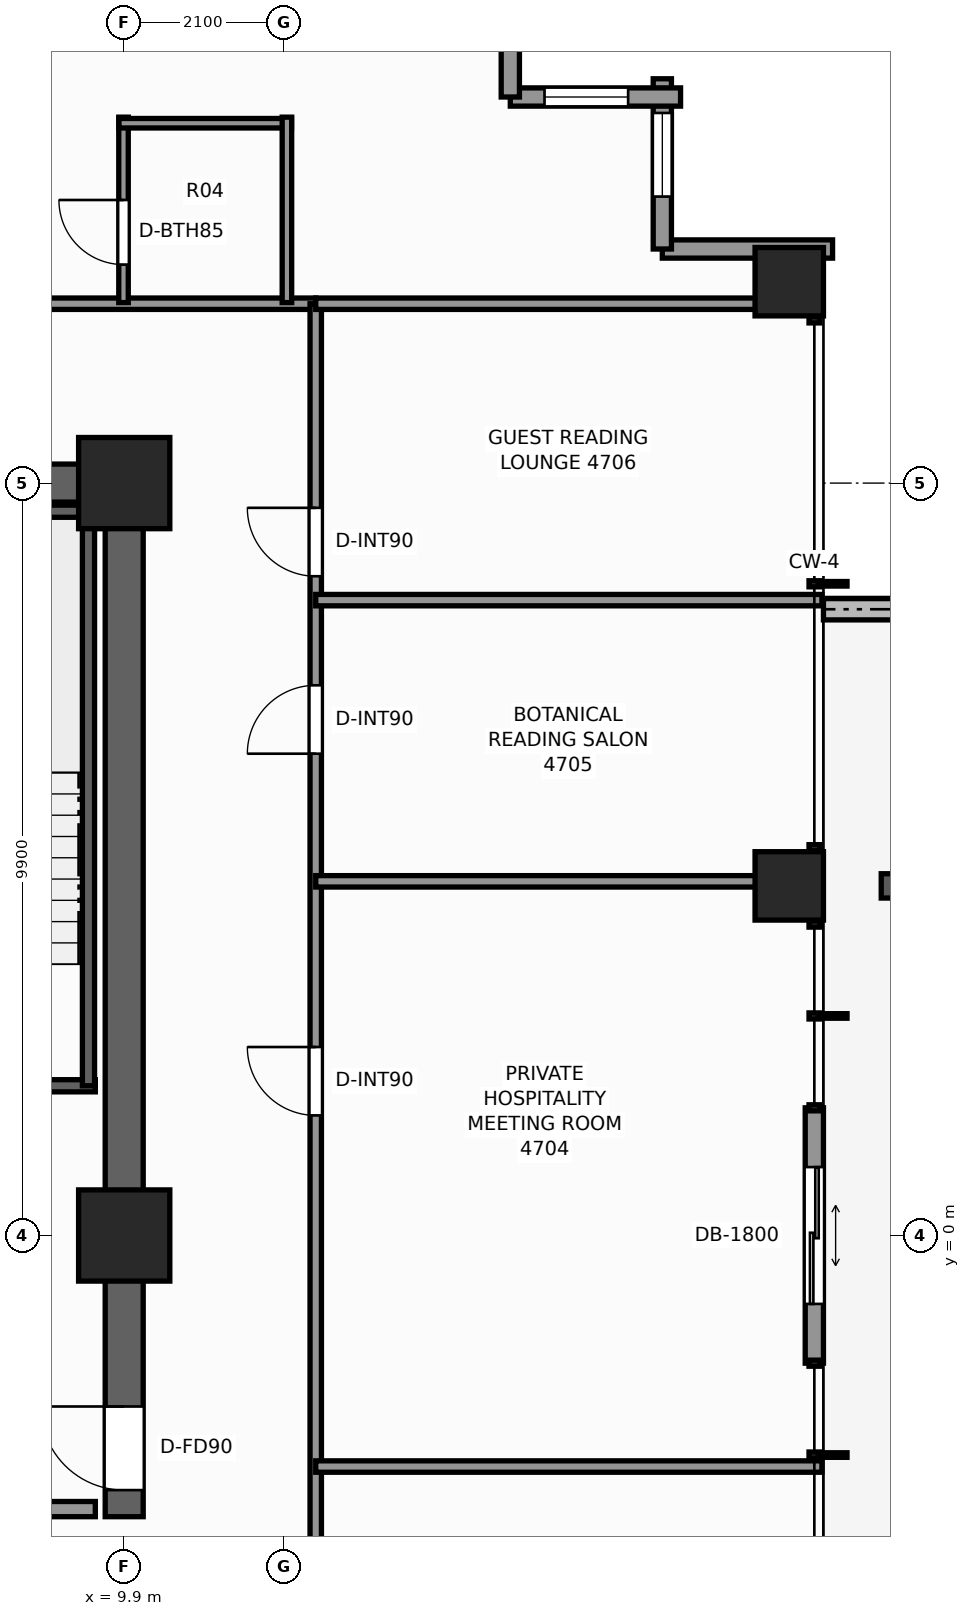
"""IFC4 building model, lengths in metres.
Left out: names, types, materials, properties, quantities, classifications, styles, units other than length and angle.
Written with IfcOpenShell. Run it as: python <this file> out.ifc"""

import sys

from ifc_helpers import new_model, si_unit, direction, frame, frame_2d, origin, origin_2d, place, context, subcontext, project, spatial, rectangle, extrude, element, fill, save


model = new_model("IFC4")
c1 = context("Model", 3, precision=1e-05, world=origin(), true_north=direction((0.0, 1.0)))
c2 = subcontext(c1, "Body", "Model", "MODEL_VIEW")
j1 = project(units=[si_unit("LENGTHUNIT", "METRE"), si_unit("PLANEANGLEUNIT", "RADIAN")], contexts=[c1])
p1 = place(None, origin())
s1 = spatial("IfcSite", under=j1, at=p1, CompositionType="ELEMENT")
p2 = place(p1, origin())
s2 = spatial("IfcBuilding", under=s1, at=p2, CompositionType="ELEMENT")
p3 = place(p2, frame((0.0, 0.0, 163.5)))
s3 = spatial("IfcBuildingStorey", under=s2, at=p3, CompositionType="ELEMENT", Elevation=163.5)
p4 = place(p3, frame((5.98, 9.9, 0.0), z_axis=(0.0, 0.0, 1.0), x_axis=(1.0, 0.0, 0.0)))
e1 = element("IfcWall", 1, at=p4, inside=s3, PredefinedType="SHEAR", context=c2, shape_type="SweptSolid", body=[
    extrude(rectangle(XDim=4.17, YDim=0.5, at=frame_2d((2.085, 0.0))), origin(), (0.0, 0.0, 1.0), 3.3),
])
p5 = place(p3, frame((9.9, -3.7, 0.0), z_axis=(0.0, 0.0, 1.0), x_axis=(0.0, 1.0, 0.0)))
e2 = element("IfcWall", 2, at=p5, inside=s3, PredefinedType="SHEAR", context=c2, shape_type="SweptSolid", body=[
    extrude(rectangle(XDim=13.35, YDim=0.5, at=frame_2d((6.675, 0.0))), origin(), (0.0, 0.0, 1.0), 3.3),
])
p6 = place(p5, frame((0.35, 0.0, 0.0)))
e3 = element("IfcOpeningElement", 3, at=p6, cuts=e2, PredefinedType="OPENING", context=c2, shape_type="SweptSolid", body=[
    extrude(rectangle(XDim=1.1, YDim=2.2, at=frame_2d((0.55, 1.1))), frame((0.0, 0.26, 0.0), z_axis=(0.0, -1.0, 0.0), x_axis=(1.0, 0.0, 0.0)), (0.0, 0.0, 1.0), 0.52),
])
for number, where, z_axis, x_axis in (
    (4, (9.9, 9.9, 0.0), (0.0, 0.0, 1.0), (1.0, 0.0, 0.0)),
    (5, (9.9, 0.0, 0.0), (0.0, 0.0, 1.0), (1.0, 0.0, 0.0)),
):
    element("IfcColumn", number, at=place(p3, frame(where, z_axis=z_axis, x_axis=x_axis)), inside=s3, PredefinedType="COLUMN", context=c2, shape_type="SweptSolid", body=[
        extrude(rectangle(XDim=1.2, YDim=1.2, at=origin_2d()), origin(), (0.0, 0.0, 1.0), 3.3),
    ])
for number, where, z_axis, x_axis in (
    (6, (18.65, 4.6, 0.0), (0.0, 0.0, 1.0), (1.0, 0.0, 0.0)),
    (7, (18.65, 12.55, 0.0), (0.0, 0.0, 1.0), (1.0, 0.0, 0.0)),
):
    element("IfcColumn", number, at=place(p3, frame(where, z_axis=z_axis, x_axis=x_axis)), inside=s3, PredefinedType="COLUMN", context=c2, shape_type="SweptSolid", body=[
        extrude(rectangle(XDim=0.9, YDim=0.9, at=origin_2d()), origin(), (0.0, 0.0, 1.0), 3.3),
    ])
p7 = place(p3, frame((20.413, 8.24, -0.02), z_axis=(0.0, 0.0, 1.0), x_axis=(-1.0, 0.0, 0.0)))
e8 = element("IfcWall", 8, at=p7, inside=s3, PredefinedType="PARAPET", context=c2, shape_type="SweptSolid", body=[
    extrude(rectangle(XDim=1.313, YDim=0.28, at=frame_2d((0.656, 0.0))), origin(), (0.0, 0.0, 1.0), 0.42),
])
p8 = place(p3, frame((18.98, 1.68, 0.0), z_axis=(0.0, 0.0, 1.0), x_axis=(0.0, -1.0, 0.0)))
e9 = element("IfcWall", 9, at=p8, inside=s3, PredefinedType="STANDARD", context=c2, shape_type="SweptSolid", body=[
    extrude(rectangle(XDim=3.36, YDim=0.24, at=frame_2d((1.68, 0.0))), origin(), (0.0, 0.0, 1.0), 3.1),
])
p9 = place(p8, frame((0.78, 0.0, 0.0)))
e10 = element("IfcOpeningElement", 10, at=p9, cuts=e9, PredefinedType="OPENING", context=c2, shape_type="SweptSolid", body=[
    extrude(rectangle(XDim=1.8, YDim=2.2, at=frame_2d((0.9, 1.1))), frame((0.0, 0.13, 0.0), z_axis=(0.0, -1.0, 0.0), x_axis=(1.0, 0.0, 0.0)), (0.0, 0.0, 1.0), 0.26),
])
p10 = place(p3, frame((16.98, 12.98, 0.0), z_axis=(0.0, 0.0, 1.0), x_axis=(1.0, 0.0, 0.0)))
e11 = element("IfcWall", 11, at=p10, inside=s3, PredefinedType="STANDARD", context=c2, shape_type="SweptSolid", body=[
    extrude(rectangle(XDim=2.24, YDim=0.24, at=frame_2d((1.12, 0.0))), origin(), (0.0, 0.0, 1.0), 2.483),
])
p11 = place(p3, frame((16.98, 15.22, 0.0), z_axis=(0.0, 0.0, 1.0), x_axis=(0.0, -1.0, 0.0)))
e12 = element("IfcWall", 12, at=p11, inside=s3, PredefinedType="STANDARD", context=c2, shape_type="SweptSolid", body=[
    extrude(rectangle(XDim=2.24, YDim=0.24, at=frame_2d((1.12, 0.0))), origin(), (0.0, 0.0, 1.0), 2.483),
])
p12 = place(p11, frame((0.45, 0.0, 0.65)))
e13 = element("IfcOpeningElement", 13, at=p12, cuts=e12, PredefinedType="OPENING", context=c2, shape_type="SweptSolid", body=[
    extrude(rectangle(XDim=1.1, YDim=1.45, at=frame_2d((0.55, 0.725))), frame((0.0, 0.13, 0.0), z_axis=(0.0, -1.0, 0.0), x_axis=(1.0, 0.0, 0.0)), (0.0, 0.0, 1.0), 0.26),
])
p13 = place(p3, frame((14.98, 14.98, 0.0), z_axis=(0.0, 0.0, 1.0), x_axis=(1.0, 0.0, 0.0)))
e14 = element("IfcWall", 14, at=p13, inside=s3, PredefinedType="STANDARD", context=c2, shape_type="SweptSolid", body=[
    extrude(rectangle(XDim=2.24, YDim=0.24, at=frame_2d((1.12, 0.0))), origin(), (0.0, 0.0, 1.0), 2.483),
])
p14 = place(p13, frame((0.45, 0.0, 0.65)))
e15 = element("IfcOpeningElement", 15, at=p14, cuts=e14, PredefinedType="OPENING", context=c2, shape_type="SweptSolid", body=[
    extrude(rectangle(XDim=1.1, YDim=1.45, at=frame_2d((0.55, 0.725))), frame((0.0, 0.13, 0.0), z_axis=(0.0, -1.0, 0.0), x_axis=(1.0, 0.0, 0.0)), (0.0, 0.0, 1.0), 0.26),
])
p15 = place(p3, frame((14.98, 17.22, 0.0), z_axis=(0.0, 0.0, 1.0), x_axis=(0.0, -1.0, 0.0)))
e16 = element("IfcWall", 16, at=p15, inside=s3, PredefinedType="STANDARD", context=c2, shape_type="SweptSolid", body=[
    extrude(rectangle(XDim=2.24, YDim=0.24, at=frame_2d((1.12, 0.0))), origin(), (0.0, 0.0, 1.0), 2.483),
])
p16 = place(p15, frame((0.45, 0.0, 0.65)))
e17 = element("IfcOpeningElement", 17, at=p16, cuts=e16, PredefinedType="OPENING", context=c2, shape_type="SweptSolid", body=[
    extrude(rectangle(XDim=1.1, YDim=1.45, at=frame_2d((0.55, 0.725))), frame((0.0, 0.13, 0.0), z_axis=(0.0, -1.0, 0.0), x_axis=(1.0, 0.0, 0.0)), (0.0, 0.0, 1.0), 0.26),
])
p17 = place(p3, frame((6.0, 1.97, 0.0), z_axis=(0.0, 0.0, 1.0), x_axis=(1.0, 0.0, 0.0)))
e18 = element("IfcWall", 18, at=p17, inside=s3, PredefinedType="SHEAR", context=c2, shape_type="SweptSolid", body=[
    extrude(rectangle(XDim=3.52, YDim=0.16, at=frame_2d((1.76, 0.0))), origin(), (0.0, 0.0, 1.0), 3.3),
])
p18 = place(p17, frame((1.15, 0.0, 0.0)))
e19 = element("IfcOpeningElement", 19, at=p18, cuts=e18, PredefinedType="OPENING", context=c2, shape_type="SweptSolid", body=[
    extrude(rectangle(XDim=1.1, YDim=2.2, at=frame_2d((0.55, 1.1))), frame((0.0, 0.09, 0.0), z_axis=(0.0, -1.0, 0.0), x_axis=(1.0, 0.0, 0.0)), (0.0, 0.0, 1.0), 0.18),
])
p19 = place(p3, frame((6.0, 9.53, 0.0), z_axis=(0.0, 0.0, 1.0), x_axis=(1.0, 0.0, 0.0)))
e20 = element("IfcWall", 20, at=p19, inside=s3, PredefinedType="SHEAR", context=c2, shape_type="SweptSolid", body=[
    extrude(rectangle(XDim=3.52, YDim=0.16, at=frame_2d((1.76, 0.0))), origin(), (0.0, 0.0, 1.0), 3.3),
])
p20 = place(p3, frame((9.43, 1.97, 0.0), z_axis=(0.0, 0.0, 1.0), x_axis=(0.0, 1.0, 0.0)))
e21 = element("IfcWall", 21, at=p20, inside=s3, PredefinedType="SHEAR", context=c2, shape_type="SweptSolid", body=[
    extrude(rectangle(XDim=7.56, YDim=0.16, at=frame_2d((3.78, 0.0))), origin(), (0.0, 0.0, 1.0), 3.3),
])
p21 = place(p3, frame((5.75, -3.6, 0.0), z_axis=(0.0, 0.0, 1.0), x_axis=(1.0, 0.0, 0.0)))
e22 = element("IfcWall", 22, at=p21, inside=s3, PredefinedType="SOLIDWALL", context=c2, shape_type="SweptSolid", body=[
    extrude(rectangle(XDim=3.77, YDim=0.2, at=frame_2d((1.885, 0.0))), origin(), (0.0, 0.0, 1.0), 3.1),
])
p22 = place(p21, frame((1.15, 0.0, 0.0)))
e23 = element("IfcOpeningElement", 23, at=p22, cuts=e22, PredefinedType="OPENING", context=c2, shape_type="SweptSolid", body=[
    extrude(rectangle(XDim=0.95, YDim=2.06, at=frame_2d((0.475, 1.03))), frame((0.0, 0.11, 0.0), z_axis=(0.0, -1.0, 0.0), x_axis=(1.0, 0.0, 0.0)), (0.0, 0.0, 1.0), 0.22),
])
p23 = place(p3, frame((-12.42, 12.26, 0.0), z_axis=(0.0, 0.0, 1.0), x_axis=(1.0, 0.0, 0.0)))
e24 = element("IfcWall", 24, at=p23, inside=s3, PredefinedType="PARTITIONING", context=c2, shape_type="SweptSolid", body=[
    extrude(rectangle(XDim=24.84, YDim=0.15, at=frame_2d((12.42, 0.0))), origin(), (0.0, 0.0, 1.0), 2.389),
])
p24 = place(p23, frame((3.541, 0.0, 0.0)))
e25 = element("IfcOpeningElement", 25, at=p24, cuts=e24, PredefinedType="OPENING", context=c2, shape_type="SweptSolid", body=[
    extrude(rectangle(XDim=0.95, YDim=2.06, at=frame_2d((0.475, 1.03))), frame((0.0, 0.085, 0.0), z_axis=(0.0, -1.0, 0.0), x_axis=(1.0, 0.0, 0.0)), (0.0, 0.0, 1.0), 0.17),
])
p25 = place(p23, frame((13.975, 0.0, 0.0)))
e26 = element("IfcOpeningElement", 26, at=p25, cuts=e24, PredefinedType="OPENING", context=c2, shape_type="SweptSolid", body=[
    extrude(rectangle(XDim=0.95, YDim=2.06, at=frame_2d((0.475, 1.03))), frame((0.0, 0.085, 0.0), z_axis=(0.0, -1.0, 0.0), x_axis=(1.0, 0.0, 0.0)), (0.0, 0.0, 1.0), 0.17),
])
p26 = place(p23, frame((20.05, 0.0, 0.0)))
e27 = element("IfcOpeningElement", 27, at=p26, cuts=e24, PredefinedType="OPENING", context=c2, shape_type="SweptSolid", body=[
    extrude(rectangle(XDim=0.95, YDim=2.06, at=frame_2d((0.475, 1.03))), frame((0.0, 0.085, 0.0), z_axis=(0.0, -1.0, 0.0), x_axis=(1.0, 0.0, 0.0)), (0.0, 0.0, 1.0), 0.17),
])
p27 = place(p3, frame((12.42, -12.58, 0.0), z_axis=(0.0, 0.0, 1.0), x_axis=(0.0, 1.0, 0.0)))
e28 = element("IfcWall", 28, at=p27, inside=s3, PredefinedType="PARTITIONING", context=c2, shape_type="SweptSolid", body=[
    extrude(rectangle(XDim=24.84, YDim=0.15, at=frame_2d((12.42, 0.0))), origin(), (0.0, 0.0, 1.0), 2.389),
])
p28 = place(p27, frame((4.595, 0.0, 0.0)))
e29 = element("IfcOpeningElement", 29, at=p28, cuts=e28, PredefinedType="OPENING", context=c2, shape_type="SweptSolid", body=[
    extrude(rectangle(XDim=0.9, YDim=2.06, at=frame_2d((0.45, 1.03))), frame((0.0, 0.085, 0.0), z_axis=(0.0, -1.0, 0.0), x_axis=(1.0, 0.0, 0.0)), (0.0, 0.0, 1.0), 0.17),
])
p29 = place(p27, frame((14.16, 0.0, 0.0)))
e30 = element("IfcOpeningElement", 30, at=p29, cuts=e28, PredefinedType="OPENING", context=c2, shape_type="SweptSolid", body=[
    extrude(rectangle(XDim=0.9, YDim=2.06, at=frame_2d((0.45, 1.03))), frame((0.0, 0.085, 0.0), z_axis=(0.0, -1.0, 0.0), x_axis=(1.0, 0.0, 0.0)), (0.0, 0.0, 1.0), 0.17),
])
p30 = place(p27, frame((18.919, 0.0, 0.0)))
e31 = element("IfcOpeningElement", 31, at=p30, cuts=e28, PredefinedType="OPENING", context=c2, shape_type="SweptSolid", body=[
    extrude(rectangle(XDim=0.9, YDim=2.06, at=frame_2d((0.45, 1.03))), frame((0.0, 0.085, 0.0), z_axis=(0.0, -1.0, 0.0), x_axis=(1.0, 0.0, 0.0)), (0.0, 0.0, 1.0), 0.17),
])
p31 = place(p27, frame((21.254, 0.0, 0.0)))
e32 = element("IfcOpeningElement", 32, at=p31, cuts=e28, PredefinedType="OPENING", context=c2, shape_type="SweptSolid", body=[
    extrude(rectangle(XDim=0.9, YDim=2.06, at=frame_2d((0.45, 1.03))), frame((0.0, 0.085, 0.0), z_axis=(0.0, -1.0, 0.0), x_axis=(1.0, 0.0, 0.0)), (0.0, 0.0, 1.0), 0.17),
])
p32 = place(p3, frame((12.42, 12.26, 0.0), z_axis=(0.0, 0.0, 1.0), x_axis=(1.0, 0.0, 0.0)))
e33 = element("IfcWall", 33, at=p32, inside=s3, PredefinedType="PARTITIONING", context=c2, shape_type="SweptSolid", body=[
    extrude(rectangle(XDim=6.66, YDim=0.15, at=frame_2d((3.33, 0.0))), origin(), (0.0, 0.0, 1.0), 2.389),
])
p33 = place(p3, frame((12.42, -3.04, 0.0), z_axis=(0.0, 0.0, 1.0), x_axis=(1.0, 0.0, 0.0)))
e34 = element("IfcWall", 34, at=p33, inside=s3, PredefinedType="PARTITIONING", context=c2, shape_type="SweptSolid", body=[
    extrude(rectangle(XDim=6.66, YDim=0.15, at=frame_2d((3.33, 0.0))), origin(), (0.0, 0.0, 1.0), 2.473),
])
p34 = place(p3, frame((12.42, 4.66, 0.0), z_axis=(0.0, 0.0, 1.0), x_axis=(1.0, 0.0, 0.0)))
e35 = element("IfcWall", 35, at=p34, inside=s3, PredefinedType="PARTITIONING", context=c2, shape_type="SweptSolid", body=[
    extrude(rectangle(XDim=6.66, YDim=0.15, at=frame_2d((3.33, 0.0))), origin(), (0.0, 0.0, 1.0), 2.389),
])
p35 = place(p3, frame((12.42, 8.36, 0.0), z_axis=(0.0, 0.0, 1.0), x_axis=(1.0, 0.0, 0.0)))
e36 = element("IfcWall", 36, at=p35, inside=s3, PredefinedType="PARTITIONING", context=c2, shape_type="SweptSolid", body=[
    extrude(rectangle(XDim=6.66, YDim=0.15, at=frame_2d((3.33, 0.0))), origin(), (0.0, 0.0, 1.0), 2.473),
])
p36 = place(p3, frame((9.891, 12.275, 0.0), z_axis=(0.0, 0.0, 1.0), x_axis=(0.0, 1.0, 0.0)))
e37 = element("IfcWall", 37, at=p36, inside=s3, PredefinedType="PARTITIONING", context=c2, shape_type="SweptSolid", body=[
    extrude(rectangle(XDim=2.44, YDim=0.125, at=frame_2d((1.22, 0.0))), origin(), (0.0, 0.0, 1.0), 3.1),
])
p37 = place(p36, frame((0.5, 0.0, 0.0)))
e38 = element("IfcOpeningElement", 38, at=p37, cuts=e37, PredefinedType="OPENING", context=c2, shape_type="SweptSolid", body=[
    extrude(rectangle(XDim=0.85, YDim=2.03, at=frame_2d((0.425, 1.015))), frame((0.0, 0.073, 0.0), z_axis=(0.0, -1.0, 0.0), x_axis=(1.0, 0.0, 0.0)), (0.0, 0.0, 1.0), 0.145),
])
p38 = place(p3, frame((9.831, 14.635, 0.0), z_axis=(0.0, 0.0, 1.0), x_axis=(1.0, 0.0, 0.0)))
e39 = element("IfcWall", 39, at=p38, inside=s3, PredefinedType="PARTITIONING", context=c2, shape_type="SweptSolid", body=[
    extrude(rectangle(XDim=2.27, YDim=0.125, at=frame_2d((1.135, 0.0))), origin(), (0.0, 0.0, 1.0), 2.389),
])
p39 = place(p3, frame((12.041, 12.275, 0.0), z_axis=(0.0, 0.0, 1.0), x_axis=(0.0, 1.0, 0.0)))
e40 = element("IfcWall", 40, at=p39, inside=s3, PredefinedType="PARTITIONING", context=c2, shape_type="SweptSolid", body=[
    extrude(rectangle(XDim=2.44, YDim=0.125, at=frame_2d((1.22, 0.0))), origin(), (0.0, 0.0, 1.0), 3.1),
])
p40 = place(p9, origin())
e41 = element("IfcDoor", 41, at=p40, inside=s3, OperationType="DOUBLE_DOOR_SLIDING", PredefinedType="DOOR", context=c2, shape_type="SweptSolid", body=[
    extrude(rectangle(XDim=1.8, YDim=2.2, at=frame_2d((0.9, 1.1))), frame((0.0, 0.025, 0.0), z_axis=(0.0, -1.0, 0.0), x_axis=(1.0, 0.0, 0.0)), (0.0, 0.0, 1.0), 0.05),
])
fill(e10, e41)
p41 = place(p12, origin())
e42 = element("IfcWindow", 42, at=p41, inside=s3, PartitioningType="SINGLE_PANEL", PredefinedType="WINDOW", context=c2, shape_type="SweptSolid", body=[
    extrude(rectangle(XDim=1.1, YDim=1.45, at=frame_2d((0.55, 0.725))), frame((0.0, 0.03, 0.0), z_axis=(0.0, -1.0, 0.0), x_axis=(1.0, 0.0, 0.0)), (0.0, 0.0, 1.0), 0.06),
])
fill(e13, e42)
p42 = place(p14, origin())
e43 = element("IfcWindow", 43, at=p42, inside=s3, PartitioningType="SINGLE_PANEL", PredefinedType="WINDOW", context=c2, shape_type="SweptSolid", body=[
    extrude(rectangle(XDim=1.1, YDim=1.45, at=frame_2d((0.55, 0.725))), frame((0.0, 0.03, 0.0), z_axis=(0.0, -1.0, 0.0), x_axis=(1.0, 0.0, 0.0)), (0.0, 0.0, 1.0), 0.06),
])
fill(e15, e43)
p43 = place(p6, origin())
e44 = element("IfcDoor", 44, at=p43, inside=s3, OperationType="SINGLE_SWING_RIGHT", PredefinedType="DOOR", context=c2, shape_type="SweptSolid", body=[
    extrude(rectangle(XDim=1.1, YDim=2.2, at=frame_2d((0.55, 1.1))), frame((0.0, 0.025, 0.0), z_axis=(0.0, -1.0, 0.0), x_axis=(1.0, 0.0, 0.0)), (0.0, 0.0, 1.0), 0.05),
])
fill(e3, e44)
p44 = place(p29, origin())
e45 = element("IfcDoor", 45, at=p44, inside=s3, OperationType="SINGLE_SWING_RIGHT", PredefinedType="DOOR", context=c2, shape_type="SweptSolid", body=[
    extrude(rectangle(XDim=0.9, YDim=2.06, at=frame_2d((0.45, 1.03))), frame((0.0, 0.025, 0.0), z_axis=(0.0, -1.0, 0.0), x_axis=(1.0, 0.0, 0.0)), (0.0, 0.0, 1.0), 0.05),
])
fill(e30, e45)
p45 = place(p30, origin())
e46 = element("IfcDoor", 46, at=p45, inside=s3, OperationType="SINGLE_SWING_LEFT", PredefinedType="DOOR", context=c2, shape_type="SweptSolid", body=[
    extrude(rectangle(XDim=0.9, YDim=2.06, at=frame_2d((0.45, 1.03))), frame((0.0, 0.025, 0.0), z_axis=(0.0, -1.0, 0.0), x_axis=(1.0, 0.0, 0.0)), (0.0, 0.0, 1.0), 0.05),
])
fill(e31, e46)
p46 = place(p31, origin())
e47 = element("IfcDoor", 47, at=p46, inside=s3, OperationType="SINGLE_SWING_RIGHT", PredefinedType="DOOR", context=c2, shape_type="SweptSolid", body=[
    extrude(rectangle(XDim=0.9, YDim=2.06, at=frame_2d((0.45, 1.03))), frame((0.0, 0.025, 0.0), z_axis=(0.0, -1.0, 0.0), x_axis=(1.0, 0.0, 0.0)), (0.0, 0.0, 1.0), 0.05),
])
fill(e32, e47)
p47 = place(p37, origin())
e48 = element("IfcDoor", 48, at=p47, inside=s3, OperationType="SINGLE_SWING_RIGHT", PredefinedType="DOOR", context=c2, shape_type="SweptSolid", body=[
    extrude(rectangle(XDim=0.85, YDim=2.03, at=frame_2d((0.425, 1.015))), frame((0.0, 0.025, 0.0), z_axis=(0.0, -1.0, 0.0), x_axis=(1.0, 0.0, 0.0)), (0.0, 0.0, 1.0), 0.05),
])
fill(e38, e48)
save(model, sys.argv[1])
